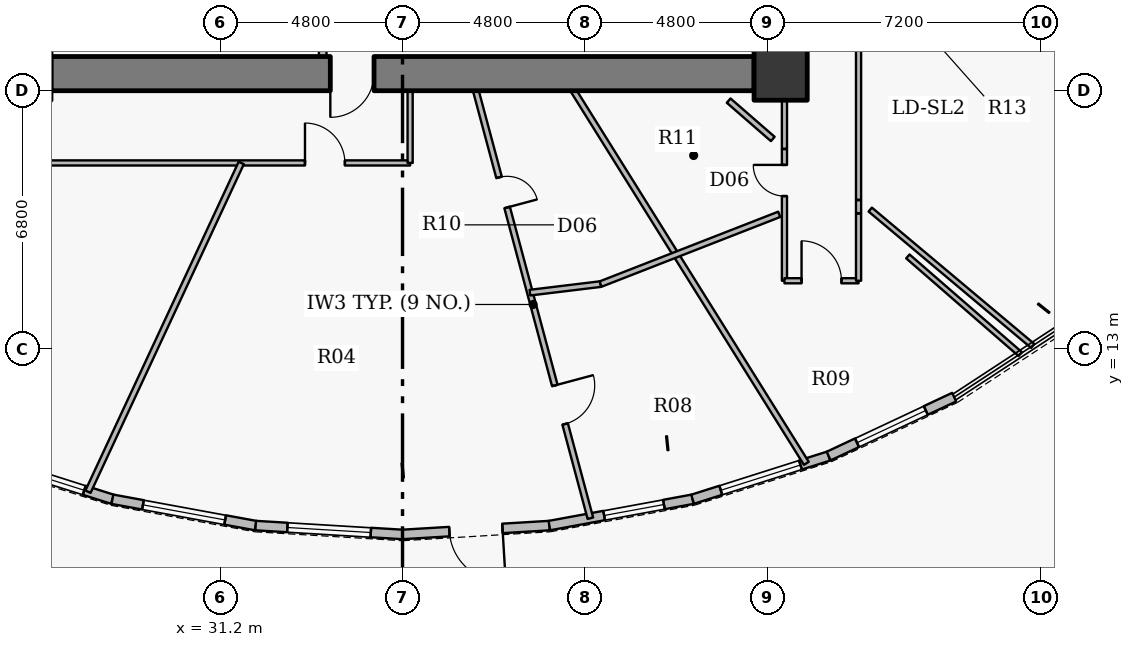
"""IFC4 building model, lengths in metres.
Left out: names, types, materials, properties, quantities, classifications, styles, units other than length and angle.
Written with IfcOpenShell. Run it as: python <this file> out.ifc"""

import sys

from ifc_helpers import new_model, si_unit, direction, frame, frame_2d, origin, origin_2d, place, context, subcontext, project, spatial, rectangle, extrude, source, transform, mapped, element, fill, save


model = new_model("IFC4")
c1 = context("Model", 3, precision=1e-05, world=origin(), true_north=direction((0.0, 1.0)))
c2 = subcontext(c1, "Body", "Model", "MODEL_VIEW")
j1 = project(units=[si_unit("LENGTHUNIT", "METRE"), si_unit("PLANEANGLEUNIT", "RADIAN")], contexts=[c1])
p1 = place(None, origin())
s1 = spatial("IfcSite", under=j1, at=p1, CompositionType="ELEMENT")
p2 = place(p1, origin())
s2 = spatial("IfcBuilding", under=s1, at=p2, CompositionType="ELEMENT")
p3 = place(p2, frame((0.0, 0.0, 27.0)))
s3 = spatial("IfcBuildingStorey", under=s2, at=p3, CompositionType="ELEMENT", Elevation=27.0)
p4 = place(p3, frame((45.95, 20.25, 0.0), z_axis=(0.0, 0.0, 1.0), x_axis=(1.0, 0.0, 0.0)))
e1 = element("IfcColumn", 1, at=p4, inside=s3, PredefinedType="COLUMN", context=c2, shape_type="SweptSolid", body=[
    extrude(rectangle(XDim=1.4, YDim=1.4, at=origin_2d()), origin(), (0.0, 0.0, 1.0), 5.4),
])
p5 = place(p3, frame((45.25, 20.25, 0.0), z_axis=(0.0, 0.0, 1.0), x_axis=(-1.0, 0.0, 0.0)))
e2 = element("IfcWall", 2, at=p5, inside=s3, PredefinedType="SHEAR", context=c2, shape_type="SweptSolid", body=[
    extrude(rectangle(XDim=18.5, YDim=0.9, at=frame_2d((9.25, 0.0))), origin(), (0.0, 0.0, 1.0), 4.6),
])
p6 = place(p5, frame((10.0, 0.0, 0.0)))
e3 = element("IfcOpeningElement", 3, at=p6, cuts=e2, PredefinedType="OPENING", context=c2, shape_type="SweptSolid", body=[
    extrude(rectangle(XDim=1.15, YDim=2.15, at=origin_2d()), frame((0.575, 0.46, 1.075), z_axis=(0.0, -1.0, 0.0), x_axis=(1.0, 0.0, 0.0)), (0.0, 0.0, 1.0), 0.92),
])
p7 = place(p3, frame((28.366, 9.051, 0.0), z_axis=(0.0, 0.0, 1.0), x_axis=(-0.953166212936, 0.302446971412, 0.0)))
e4 = element("IfcWall", 4, at=p7, inside=s3, PredefinedType="SOLIDWALL", context=c2, shape_type="SweptSolid", body=[
    extrude(rectangle(XDim=3.756, YDim=0.25, at=frame_2d((1.878, 0.0))), origin(), (0.0, 0.0, 1.0), 3.185),
])
p8 = place(p7, frame((0.778, 0.0, 0.9)))
e5 = element("IfcOpeningElement", 5, at=p8, cuts=e4, PredefinedType="OPENING", context=c2, shape_type="SweptSolid", body=[
    extrude(rectangle(XDim=2.2, YDim=2.0, at=origin_2d()), frame((1.1, 0.135, 1.0), z_axis=(0.0, -1.0, 0.0), x_axis=(1.0, 0.0, 0.0)), (0.0, 0.0, 1.0), 0.27),
])
p9 = place(p3, frame((32.135, 8.358, 0.0), z_axis=(0.0, 0.0, 1.0), x_axis=(-0.983496768781, 0.180925691368, 0.0)))
e6 = element("IfcWall", 6, at=p9, inside=s3, PredefinedType="SOLIDWALL", context=c2, shape_type="SweptSolid", body=[
    extrude(rectangle(XDim=3.832, YDim=0.25, at=frame_2d((1.916, 0.0))), origin(), (0.0, 0.0, 1.0), 5.15),
])
p10 = place(p9, frame((0.816, 0.0, 0.9)))
e7 = element("IfcOpeningElement", 7, at=p10, cuts=e6, PredefinedType="OPENING", context=c2, shape_type="SweptSolid", body=[
    extrude(rectangle(XDim=2.2, YDim=2.0, at=origin_2d()), frame((1.1, 0.135, 1.0), z_axis=(0.0, -1.0, 0.0), x_axis=(1.0, 0.0, 0.0)), (0.0, 0.0, 1.0), 0.27),
])
p11 = place(p3, frame((36.0, 8.125, 0.0), z_axis=(0.0, 0.0, 1.0), x_axis=(-0.998188749064, 0.060159963776, 0.0)))
e8 = element("IfcWall", 8, at=p11, inside=s3, PredefinedType="SOLIDWALL", context=c2, shape_type="SweptSolid", body=[
    extrude(rectangle(XDim=3.872, YDim=0.25, at=frame_2d((1.936, 0.0))), origin(), (0.0, 0.0, 1.0), 3.185),
])
p12 = place(p11, frame((0.836, 0.0, 0.9)))
e9 = element("IfcOpeningElement", 9, at=p12, cuts=e8, PredefinedType="OPENING", context=c2, shape_type="SweptSolid", body=[
    extrude(rectangle(XDim=2.2, YDim=2.0, at=origin_2d()), frame((1.1, 0.135, 1.0), z_axis=(0.0, -1.0, 0.0), x_axis=(1.0, 0.0, 0.0)), (0.0, 0.0, 1.0), 0.27),
])
p13 = place(p3, frame((39.865, 8.358, 0.0), z_axis=(0.0, 0.0, 1.0), x_axis=(-0.998188749064, -0.060159963776, 0.0)))
e10 = element("IfcWall", 10, at=p13, inside=s3, PredefinedType="SOLIDWALL", context=c2, shape_type="SweptSolid", body=[
    extrude(rectangle(XDim=3.872, YDim=0.25, at=frame_2d((1.936, 0.0))), origin(), (0.0, 0.0, 1.0), 3.185),
])
p14 = place(p13, frame((1.236, 0.0, 0.0)))
e11 = element("IfcOpeningElement", 11, at=p14, cuts=e10, PredefinedType="OPENING", context=c2, shape_type="SweptSolid", body=[
    extrude(rectangle(XDim=1.4, YDim=2.2, at=origin_2d()), frame((0.7, 0.135, 1.1), z_axis=(0.0, -1.0, 0.0), x_axis=(1.0, 0.0, 0.0)), (0.0, 0.0, 1.0), 0.27),
])
p15 = place(p3, frame((43.634, 9.051, 0.0), z_axis=(0.0, 0.0, 1.0), x_axis=(-0.983496768781, -0.180925691368, 0.0)))
e12 = element("IfcWall", 12, at=p15, inside=s3, PredefinedType="SOLIDWALL", context=c2, shape_type="SweptSolid", body=[
    extrude(rectangle(XDim=3.832, YDim=0.25, at=frame_2d((1.916, 0.0))), origin(), (0.0, 0.0, 1.0), 3.185),
])
p16 = place(p15, frame((0.767, 0.0, 0.9)))
e13 = element("IfcOpeningElement", 13, at=p16, cuts=e12, PredefinedType="OPENING", context=c2, shape_type="SweptSolid", body=[
    extrude(rectangle(XDim=1.6, YDim=1.75, at=origin_2d()), frame((0.8, 0.135, 0.875), z_axis=(0.0, -1.0, 0.0), x_axis=(1.0, 0.0, 0.0)), (0.0, 0.0, 1.0), 0.27),
])
p17 = place(p3, frame((47.214, 10.187, 0.0), z_axis=(0.0, 0.0, 1.0), x_axis=(-0.953166212936, -0.302446971412, 0.0)))
e14 = element("IfcWall", 14, at=p17, inside=s3, PredefinedType="SOLIDWALL", context=c2, shape_type="SweptSolid", body=[
    extrude(rectangle(XDim=3.756, YDim=0.25, at=frame_2d((1.878, 0.0))), origin(), (0.0, 0.0, 1.0), 3.185),
])
p18 = place(p17, frame((0.778, 0.0, 0.9)))
e15 = element("IfcOpeningElement", 15, at=p18, cuts=e14, PredefinedType="OPENING", context=c2, shape_type="SweptSolid", body=[
    extrude(rectangle(XDim=2.2, YDim=2.0, at=origin_2d()), frame((1.1, 0.135, 1.0), z_axis=(0.0, -1.0, 0.0), x_axis=(1.0, 0.0, 0.0)), (0.0, 0.0, 1.0), 0.27),
])
p19 = place(p3, frame((50.516, 11.738, 0.0), z_axis=(0.0, 0.0, 1.0), x_axis=(-0.905208052634, -0.424968682901, 0.0)))
e16 = element("IfcWall", 16, at=p19, inside=s3, PredefinedType="SOLIDWALL", context=c2, shape_type="SweptSolid", body=[
    extrude(rectangle(XDim=3.649, YDim=0.25, at=frame_2d((1.824, 0.0))), origin(), (0.0, 0.0, 1.0), 5.15),
])
p20 = place(p19, frame((0.824, 0.0, 0.9)))
e17 = element("IfcOpeningElement", 17, at=p20, cuts=e16, PredefinedType="OPENING", context=c2, shape_type="SweptSolid", body=[
    extrude(rectangle(XDim=2.0, YDim=1.75, at=origin_2d()), frame((1.0, 0.135, 0.875), z_axis=(0.0, -1.0, 0.0), x_axis=(1.0, 0.0, 0.0)), (0.0, 0.0, 1.0), 0.27),
])
p21 = place(p3, frame((25.95, 17.9, 0.0), z_axis=(0.0, 0.0, 1.0), x_axis=(1.0, 0.0, 0.0)))
e18 = element("IfcWall", 18, at=p21, inside=s3, PredefinedType="PARTITIONING", context=c2, shape_type="SweptSolid", body=[
    extrude(rectangle(XDim=10.25, YDim=0.135, at=frame_2d((5.125, 0.0))), origin(), (0.0, 0.0, 1.0), 3.185),
])
p22 = place(p21, frame((7.483, 0.0, 0.0)))
e19 = element("IfcOpeningElement", 19, at=p22, cuts=e18, PredefinedType="OPENING", context=c2, shape_type="SweptSolid", body=[
    extrude(rectangle(XDim=1.05, YDim=2.15, at=origin_2d()), frame((0.525, 0.078, 1.075), z_axis=(0.0, -1.0, 0.0), x_axis=(1.0, 0.0, 0.0)), (0.0, 0.0, 1.0), 0.155),
])
p23 = place(p3, frame((27.723, 9.25, 0.0), z_axis=(0.0, 0.0, 1.0), x_axis=(0.422622169532, 0.906305964793, 0.0)))
e20 = element("IfcWall", 20, at=p23, inside=s3, PredefinedType="PARTITIONING", context=c2, shape_type="SweptSolid", body=[
    extrude(rectangle(XDim=9.544, YDim=0.15, at=frame_2d((4.772, 0.0))), origin(), (0.0, 0.0, 1.0), 5.15),
])
p24 = place(p3, frame((33.9, 20.7, 0.0), z_axis=(0.0, 0.0, 1.0), x_axis=(0.0, 1.0, 0.0)))
e21 = element("IfcWall", 21, at=p24, inside=s3, PredefinedType="PARTITIONING", context=c2, shape_type="SweptSolid", body=[
    extrude(rectangle(XDim=11.4, YDim=0.2, at=frame_2d((5.7, 0.0))), origin(), (0.0, 0.0, 1.0), 4.735),
])
p25 = place(p3, frame((36.2, 17.9, 0.0), z_axis=(0.0, 0.0, 1.0), x_axis=(0.0, 1.0, 0.0)))
e22 = element("IfcWall", 22, at=p25, inside=s3, PredefinedType="PARTITIONING", context=c2, shape_type="SweptSolid", body=[
    extrude(rectangle(XDim=1.9, YDim=0.135, at=frame_2d((0.95, 0.0))), origin(), (0.0, 0.0, 1.0), 3.185),
])
p26 = place(p3, frame((37.929, 19.8, 0.0), z_axis=(0.0, 0.0, 1.0), x_axis=(0.258828999451, -0.965923158974, 0.0)))
e23 = element("IfcWall", 23, at=p26, inside=s3, PredefinedType="PARTITIONING", context=c2, shape_type="SweptSolid", body=[
    extrude(rectangle(XDim=11.645, YDim=0.15, at=frame_2d((5.823, 0.0))), origin(), (0.0, 0.0, 1.0), 4.635),
])
p27 = place(p26, frame((2.36, 0.0, 0.0)))
e24 = element("IfcOpeningElement", 24, at=p27, cuts=e23, PredefinedType="OPENING", context=c2, shape_type="SweptSolid", body=[
    extrude(rectangle(XDim=0.82, YDim=2.1, at=origin_2d()), frame((0.41, 0.085, 1.05), z_axis=(0.0, -1.0, 0.0), x_axis=(1.0, 0.0, 0.0)), (0.0, 0.0, 1.0), 0.17),
])
p28 = place(p26, frame((8.028, 0.0, 0.0)))
e25 = element("IfcOpeningElement", 25, at=p28, cuts=e23, PredefinedType="OPENING", context=c2, shape_type="SweptSolid", body=[
    extrude(rectangle(XDim=1.05, YDim=2.15, at=origin_2d()), frame((0.525, 0.085, 1.075), z_axis=(0.0, -1.0, 0.0), x_axis=(1.0, 0.0, 0.0)), (0.0, 0.0, 1.0), 0.17),
])
p29 = place(p3, frame((39.353, 14.487, 0.0), z_axis=(0.0, 0.0, 1.0), x_axis=(0.992712995386, 0.120502733544, 0.0)))
e26 = element("IfcWall", 26, at=p29, inside=s3, PredefinedType="PARTITIONING", context=c2, shape_type="SweptSolid", body=[
    extrude(rectangle(XDim=1.872, YDim=0.15, at=frame_2d((0.936, 0.0))), origin(), (0.0, 0.0, 1.0), 3.185),
])
p30 = place(p3, frame((40.499, 19.8, 0.0), z_axis=(0.0, 0.0, 1.0), x_axis=(0.529917315657, -0.848049313759, 0.0)))
e27 = element("IfcWall", 27, at=p30, inside=s3, PredefinedType="PARTITIONING", context=c2, shape_type="SweptSolid", body=[
    extrude(rectangle(XDim=11.561, YDim=0.15, at=frame_2d((5.781, 0.0))), origin(), (0.0, 0.0, 1.0), 5.15),
])
p31 = place(p3, frame((41.211, 14.712, 0.0), z_axis=(0.0, 0.0, 1.0), x_axis=(0.931537254234, 0.363645904657, 0.0)))
e28 = element("IfcWall", 28, at=p31, inside=s3, PredefinedType="PARTITIONING", context=c2, shape_type="SweptSolid", body=[
    extrude(rectangle(XDim=5.047, YDim=0.15, at=frame_2d((2.523, 0.0))), origin(), (0.0, 0.0, 1.0), 3.185),
])
p32 = place(p3, frame((46.05, 14.8, 0.0), z_axis=(0.0, 0.0, 1.0), x_axis=(0.0, 1.0, 0.0)))
e29 = element("IfcWall", 29, at=p32, inside=s3, PredefinedType="PARTITIONING", context=c2, shape_type="SweptSolid", body=[
    extrude(rectangle(XDim=3.464, YDim=0.135, at=frame_2d((1.732, 0.0))), origin(), (0.0, 0.0, 1.0), 5.15),
])
p33 = place(p32, frame((2.228, 0.0, 0.0)))
e30 = element("IfcOpeningElement", 30, at=p33, cuts=e29, PredefinedType="OPENING", context=c2, shape_type="SweptSolid", body=[
    extrude(rectangle(XDim=0.82, YDim=2.1, at=origin_2d()), frame((0.41, 0.078, 1.05), z_axis=(0.0, -1.0, 0.0), x_axis=(1.0, 0.0, 0.0)), (0.0, 0.0, 1.0), 0.155),
])
p34 = place(p3, frame((46.05, 14.8, 0.0), z_axis=(0.0, 0.0, 1.0), x_axis=(1.0, 0.0, 0.0)))
e31 = element("IfcWall", 31, at=p34, inside=s3, PredefinedType="PARTITIONING", context=c2, shape_type="SweptSolid", body=[
    extrude(rectangle(XDim=1.95, YDim=0.135, at=frame_2d((0.975, 0.0))), origin(), (0.0, 0.0, 1.0), 5.15),
])
p35 = place(p34, frame((0.45, 0.0, 0.0)))
e32 = element("IfcOpeningElement", 32, at=p35, cuts=e31, PredefinedType="OPENING", context=c2, shape_type="SweptSolid", body=[
    extrude(rectangle(XDim=1.05, YDim=2.15, at=origin_2d()), frame((0.525, 0.078, 1.075), z_axis=(0.0, -1.0, 0.0), x_axis=(1.0, 0.0, 0.0)), (0.0, 0.0, 1.0), 0.155),
])
p36 = place(p3, frame((48.0, 14.8, 0.0), z_axis=(0.0, 0.0, 1.0), x_axis=(0.0, 1.0, 0.0)))
e33 = element("IfcWall", 33, at=p36, inside=s3, PredefinedType="PARTITIONING", context=c2, shape_type="SweptSolid", body=[
    extrude(rectangle(XDim=1.769, YDim=0.135, at=frame_2d((0.884, 0.0))), origin(), (0.0, 0.0, 1.0), 5.15),
])
p37 = place(p3, frame((48.0, 16.931, 0.0), z_axis=(0.0, 0.0, 1.0), x_axis=(0.0, 1.0, 0.0)))
e34 = element("IfcWall", 34, at=p37, inside=s3, PredefinedType="PARTITIONING", context=c2, shape_type="SweptSolid", body=[
    extrude(rectangle(XDim=4.069, YDim=0.135, at=frame_2d((2.035, 0.0))), origin(), (0.0, 0.0, 1.0), 3.185),
])
p38 = place(p3, frame((48.0, 16.921, 0.0), z_axis=(0.0, 0.0, 1.0), x_axis=(0.0, -1.0, 0.0)))
e35 = element("IfcWall", 35, at=p38, inside=s3, PredefinedType="PARTITIONING", context=c2, shape_type="SweptSolid", body=[
    extrude(rectangle(XDim=0.342, YDim=0.135, at=frame_2d((0.171, 0.0))), origin(), (0.0, 0.0, 1.0), 5.15),
])
p39 = place(p3, frame((46.05, 18.274, 0.0), z_axis=(0.0, 0.0, 1.0), x_axis=(0.0, 1.0, 0.0)))
e36 = element("IfcWall", 36, at=p39, inside=s3, PredefinedType="PARTITIONING", context=c2, shape_type="SweptSolid", body=[
    extrude(rectangle(XDim=1.526, YDim=0.135, at=frame_2d((0.763, 0.0))), origin(), (0.0, 0.0, 1.0), 3.185),
])
p40 = place(p3, frame((46.4, 19.8, 0.0), z_axis=(0.0, 0.0, 1.0), x_axis=(0.0, 1.0, 0.0)))
e37 = element("IfcWall", 37, at=p40, inside=s3, PredefinedType="PARTITIONING", context=c2, shape_type="SweptSolid", body=[
    extrude(rectangle(XDim=1.14, YDim=0.135, at=frame_2d((0.57, 0.0))), origin(), (0.0, 0.0, 1.0), 5.15),
])
p41 = place(p3, frame((52.584, 13.085, 0.0), z_axis=(0.0, 0.0, 1.0), x_axis=(-0.766040782865, 0.642791971782, 0.0)))
e38 = element("IfcWall", 38, at=p41, inside=s3, PredefinedType="PARTITIONING", context=c2, shape_type="SweptSolid", body=[
    extrude(rectangle(XDim=5.582, YDim=0.135, at=frame_2d((2.791, 0.0))), origin(), (0.0, 0.0, 1.0), 5.15),
])
p42 = place(p3, frame((44.582, 19.54, 0.0), z_axis=(0.0, 0.0, 1.0), x_axis=(0.754677286449, -0.656096176881, 0.0)))
e39 = element("IfcWall", 39, at=p42, inside=s3, PredefinedType="PARTITIONING", context=c2, shape_type="SweptSolid", body=[
    extrude(rectangle(XDim=1.538, YDim=0.15, at=frame_2d((0.769, 0.0))), origin(), (0.0, 0.0, 1.0), 5.15),
])
p43 = place(p3, frame((49.297, 15.441, 0.0), z_axis=(0.0, 0.0, 1.0), x_axis=(0.754722190452, -0.656044522299, 0.0)))
e40 = element("IfcWall", 40, at=p43, inside=s3, PredefinedType="PARTITIONING", context=c2, shape_type="SweptSolid", body=[
    extrude(rectangle(XDim=3.919, YDim=0.135, at=frame_2d((1.959, 0.0))), origin(), (0.0, 0.0, 1.0), 5.15),
])
m1 = source(origin(), c2, "Body", "SweptSolid", [
    extrude(rectangle(XDim=2.2, YDim=2.0, at=origin_2d()), frame((1.1, 0.03, 1.0), z_axis=(0.0, -1.0, 0.0), x_axis=(1.0, 0.0, 0.0)), (0.0, 0.0, 1.0), 0.06),
])
p44 = place(p8, origin())
e41 = element("IfcWindow", 41, at=p44, inside=s3, PartitioningType="TRIPLE_PANEL_VERTICAL", PredefinedType="WINDOW", context=c2, shape_type="MappedRepresentation", body=[
    mapped(m1, transform((0.0, 0.0, 0.0), x_axis=(1.0, 0.0, 0.0), y_axis=(0.0, 1.0, 0.0), z_axis=(0.0, 0.0, 1.0), scale=1.0)),
])
fill(e5, e41)
p45 = place(p10, origin())
e42 = element("IfcWindow", 42, at=p45, inside=s3, PartitioningType="TRIPLE_PANEL_VERTICAL", PredefinedType="WINDOW", context=c2, shape_type="MappedRepresentation", body=[
    mapped(m1, transform((0.0, 0.0, 0.0), x_axis=(1.0, 0.0, 0.0), y_axis=(0.0, 1.0, 0.0), z_axis=(0.0, 0.0, 1.0), scale=1.0)),
])
fill(e7, e42)
p46 = place(p12, origin())
e43 = element("IfcWindow", 43, at=p46, inside=s3, PartitioningType="TRIPLE_PANEL_VERTICAL", PredefinedType="WINDOW", context=c2, shape_type="MappedRepresentation", body=[
    mapped(m1, transform((0.0, 0.0, 0.0), x_axis=(1.0, 0.0, 0.0), y_axis=(0.0, 1.0, 0.0), z_axis=(0.0, 0.0, 1.0), scale=1.0)),
])
fill(e9, e43)
m2 = source(origin(), c2, "Body", "SweptSolid", [
    extrude(rectangle(XDim=1.4, YDim=2.2, at=origin_2d()), frame((0.7, 0.025, 1.1), z_axis=(0.0, -1.0, 0.0), x_axis=(1.0, 0.0, 0.0)), (0.0, 0.0, 1.0), 0.05),
])
p47 = place(p14, origin())
e44 = element("IfcDoor", 44, at=p47, inside=s3, OperationType="SINGLE_SWING_LEFT", PredefinedType="DOOR", context=c2, shape_type="MappedRepresentation", body=[
    mapped(m2, transform((0.0, 0.0, 0.0), x_axis=(1.0, 0.0, 0.0), y_axis=(0.0, 1.0, 0.0), z_axis=(0.0, 0.0, 1.0), scale=1.0)),
])
fill(e11, e44)
m3 = source(origin(), c2, "Body", "SweptSolid", [
    extrude(rectangle(XDim=1.6, YDim=1.75, at=origin_2d()), frame((0.8, 0.03, 0.875), z_axis=(0.0, -1.0, 0.0), x_axis=(1.0, 0.0, 0.0)), (0.0, 0.0, 1.0), 0.06),
])
p48 = place(p16, origin())
e45 = element("IfcWindow", 45, at=p48, inside=s3, PartitioningType="DOUBLE_PANEL_VERTICAL", PredefinedType="WINDOW", context=c2, shape_type="MappedRepresentation", body=[
    mapped(m3, transform((0.0, 0.0, 0.0), x_axis=(1.0, 0.0, 0.0), y_axis=(0.0, 1.0, 0.0), z_axis=(0.0, 0.0, 1.0), scale=1.0)),
])
fill(e13, e45)
p49 = place(p18, origin())
e46 = element("IfcWindow", 46, at=p49, inside=s3, PartitioningType="TRIPLE_PANEL_VERTICAL", PredefinedType="WINDOW", context=c2, shape_type="MappedRepresentation", body=[
    mapped(m1, transform((0.0, 0.0, 0.0), x_axis=(1.0, 0.0, 0.0), y_axis=(0.0, 1.0, 0.0), z_axis=(0.0, 0.0, 1.0), scale=1.0)),
])
fill(e15, e46)
m4 = source(origin(), c2, "Body", "SweptSolid", [
    extrude(rectangle(XDim=2.0, YDim=1.75, at=origin_2d()), frame((1.0, 0.03, 0.875), z_axis=(0.0, -1.0, 0.0), x_axis=(1.0, 0.0, 0.0)), (0.0, 0.0, 1.0), 0.06),
])
p50 = place(p20, origin())
e47 = element("IfcWindow", 47, at=p50, inside=s3, PartitioningType="DOUBLE_PANEL_VERTICAL", PredefinedType="WINDOW", context=c2, shape_type="MappedRepresentation", body=[
    mapped(m4, transform((0.0, 0.0, 0.0), x_axis=(1.0, 0.0, 0.0), y_axis=(0.0, 1.0, 0.0), z_axis=(0.0, 0.0, 1.0), scale=1.0)),
])
fill(e17, e47)
m5 = source(origin(), c2, "Body", "SweptSolid", [
    extrude(rectangle(XDim=1.15, YDim=2.15, at=origin_2d()), frame((0.575, 0.025, 1.075), z_axis=(0.0, -1.0, 0.0), x_axis=(1.0, 0.0, 0.0)), (0.0, 0.0, 1.0), 0.05),
])
p51 = place(p6, origin())
e48 = element("IfcDoor", 48, at=p51, inside=s3, OperationType="SINGLE_SWING_RIGHT", PredefinedType="DOOR", context=c2, shape_type="MappedRepresentation", body=[
    mapped(m5, transform((0.0, 0.0, 0.0), x_axis=(1.0, 0.0, 0.0), y_axis=(0.0, 1.0, 0.0), z_axis=(0.0, 0.0, 1.0), scale=1.0)),
])
fill(e3, e48)
m6 = source(origin(), c2, "Body", "SweptSolid", [
    extrude(rectangle(XDim=1.05, YDim=2.15, at=origin_2d()), frame((0.525, 0.025, 1.075), z_axis=(0.0, -1.0, 0.0), x_axis=(1.0, 0.0, 0.0)), (0.0, 0.0, 1.0), 0.05),
])
p52 = place(p22, origin())
e49 = element("IfcDoor", 49, at=p52, inside=s3, OperationType="SINGLE_SWING_LEFT", PredefinedType="DOOR", context=c2, shape_type="MappedRepresentation", body=[
    mapped(m6, transform((0.0, 0.0, 0.0), x_axis=(1.0, 0.0, 0.0), y_axis=(0.0, 1.0, 0.0), z_axis=(0.0, 0.0, 1.0), scale=1.0)),
])
fill(e19, e49)
m7 = source(origin(), c2, "Body", "SweptSolid", [
    extrude(rectangle(XDim=0.82, YDim=2.1, at=origin_2d()), frame((0.41, 0.025, 1.05), z_axis=(0.0, -1.0, 0.0), x_axis=(1.0, 0.0, 0.0)), (0.0, 0.0, 1.0), 0.05),
])
p53 = place(p27, origin())
e50 = element("IfcDoor", 50, at=p53, inside=s3, OperationType="SINGLE_SWING_RIGHT", PredefinedType="DOOR", context=c2, shape_type="MappedRepresentation", body=[
    mapped(m7, transform((0.0, 0.0, 0.0), x_axis=(1.0, 0.0, 0.0), y_axis=(0.0, 1.0, 0.0), z_axis=(0.0, 0.0, 1.0), scale=1.0)),
])
fill(e24, e50)
p54 = place(p28, origin())
e51 = element("IfcDoor", 51, at=p54, inside=s3, OperationType="SINGLE_SWING_LEFT", PredefinedType="DOOR", context=c2, shape_type="MappedRepresentation", body=[
    mapped(m6, transform((0.0, 0.0, 0.0), x_axis=(1.0, 0.0, 0.0), y_axis=(0.0, 1.0, 0.0), z_axis=(0.0, 0.0, 1.0), scale=1.0)),
])
fill(e25, e51)
p55 = place(p33, origin())
e52 = element("IfcDoor", 52, at=p55, inside=s3, OperationType="SINGLE_SWING_RIGHT", PredefinedType="DOOR", context=c2, shape_type="MappedRepresentation", body=[
    mapped(m7, transform((0.0, 0.0, 0.0), x_axis=(1.0, 0.0, 0.0), y_axis=(0.0, 1.0, 0.0), z_axis=(0.0, 0.0, 1.0), scale=1.0)),
])
fill(e30, e52)
p56 = place(p35, origin())
e53 = element("IfcDoor", 53, at=p56, inside=s3, OperationType="SINGLE_SWING_LEFT", PredefinedType="DOOR", context=c2, shape_type="MappedRepresentation", body=[
    mapped(m6, transform((0.0, 0.0, 0.0), x_axis=(1.0, 0.0, 0.0), y_axis=(0.0, 1.0, 0.0), z_axis=(0.0, 0.0, 1.0), scale=1.0)),
])
fill(e32, e53)
save(model, sys.argv[1])
